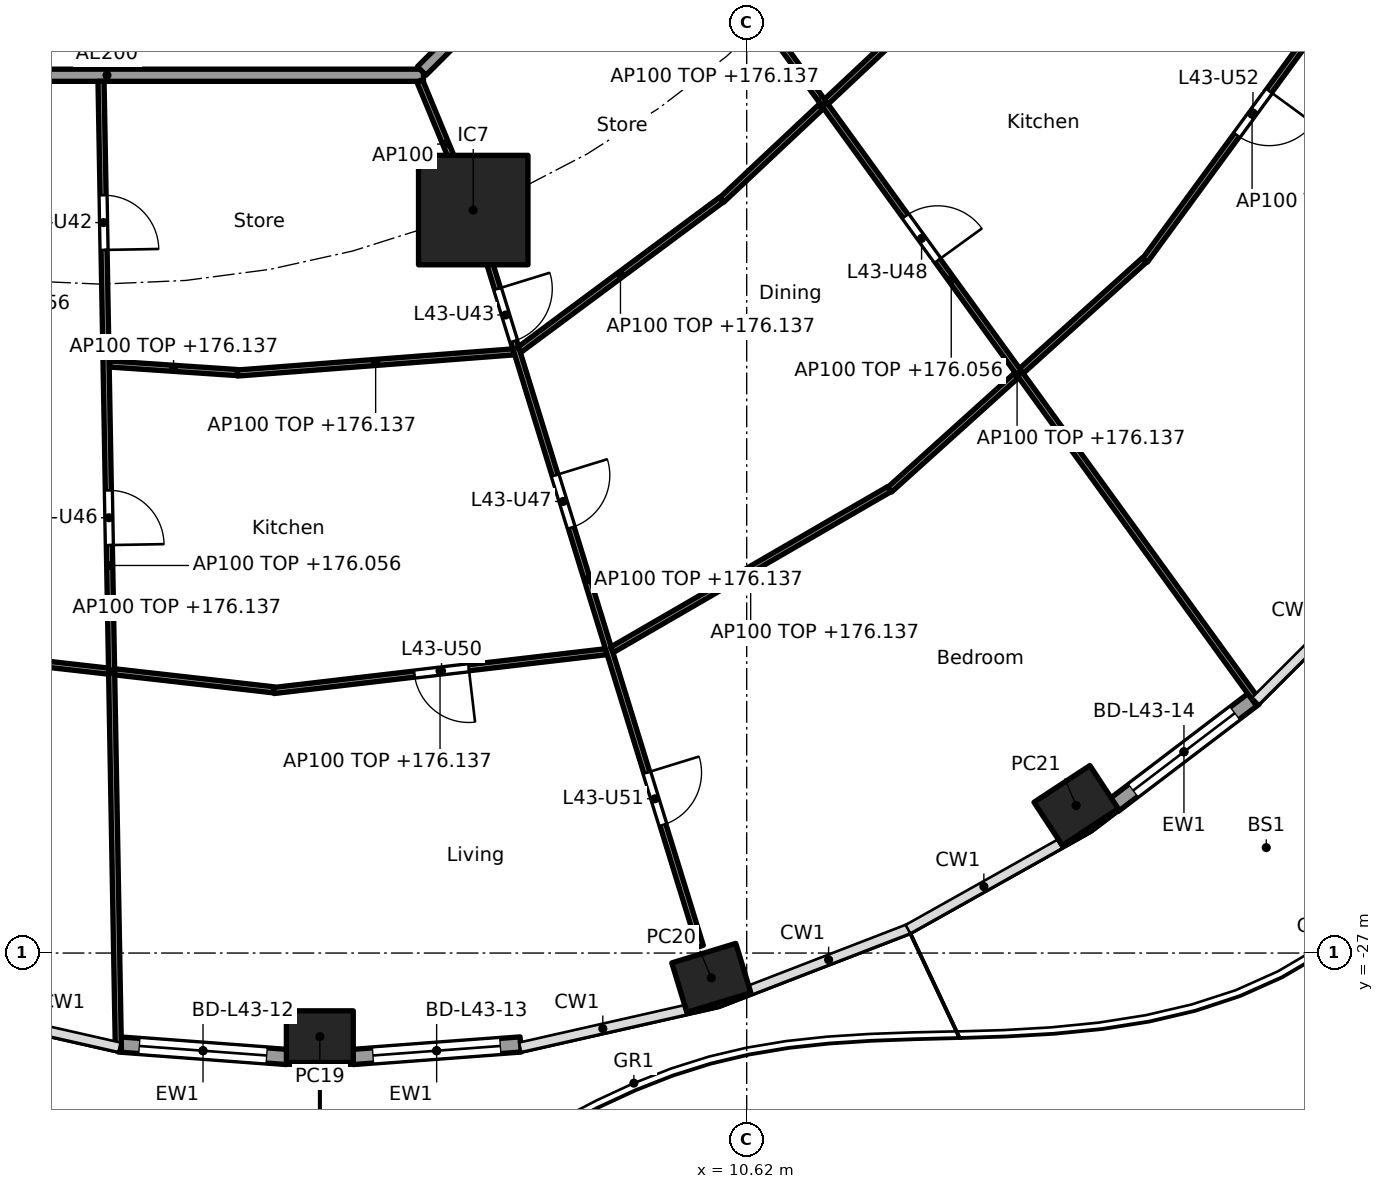
"""IFC4 building model, lengths in metres.
Left out: names, types, materials, properties, quantities, classifications, styles, units other than length and angle.
Written with IfcOpenShell. Run it as: python <this file> out.ifc"""

import sys

from ifc_helpers import new_model, si_unit, direction, frame, frame_2d, origin, origin_2d, place, context, subcontext, project, spatial, rectangle, hollow_rectangle, extrude, element, fill, save


model = new_model("IFC4")
c1 = context("Model", 3, precision=1e-05, world=origin(), true_north=direction((0.0, 1.0)))
c2 = subcontext(c1, "Body", "Model", "MODEL_VIEW")
j1 = project(units=[si_unit("LENGTHUNIT", "METRE"), si_unit("PLANEANGLEUNIT", "RADIAN")], contexts=[c1])
p1 = place(None, origin())
s1 = spatial("IfcSite", under=j1, at=p1, CompositionType="ELEMENT")
p2 = place(p1, origin())
s2 = spatial("IfcBuilding", under=s1, at=p2, CompositionType="ELEMENT")
p3 = place(p2, frame((0.0, 0.0, 173.3)))
s3 = spatial("IfcBuildingStorey", under=s2, at=p3, CompositionType="ELEMENT", Elevation=173.3)
for number, where, z_axis, x_axis in (
    (1, (3.6, -28.375, 0.0), (0.0, 0.0, 1.0), (1.0, 0.0, 0.0)),
    (2, (10.038, -27.408, 0.0), (0.0, 0.0, 1.0), (0.957, 0.292, 0.0)),
    (3, (16.038, -24.573, 0.0), (0.0, 0.0, 1.0), (0.836, 0.549, 0.0)),
):
    element("IfcColumn", number, at=place(p3, frame(where, z_axis=z_axis, x_axis=x_axis)), inside=s3, PredefinedType="COLUMN", context=c2, shape_type="SweptSolid", body=[
        extrude(hollow_rectangle(XDim=1.1, YDim=0.85, WallThickness=0.036, at=origin_2d()), origin(), (0.0, 0.0, 1.0), 3.7),
    ])
p4 = place(p3, frame((6.123, -14.782, 0.0), z_axis=(0.0, 0.0, 1.0), x_axis=(1.0, 0.0, 0.0)))
e4 = element("IfcColumn", 4, at=p4, inside=s3, PredefinedType="COLUMN", context=c2, shape_type="SweptSolid", body=[
    extrude(rectangle(XDim=1.8, YDim=1.8, at=origin_2d()), origin(), (0.0, 0.0, 1.0), 3.7),
])
p5 = place(p3, frame((3.061, -28.709, 0.0), z_axis=(0.0, 0.0, 1.0), x_axis=(-0.997232064422, 0.074351931305, 0.0)))
e5 = element("IfcWall", 5, at=p5, inside=s3, PredefinedType="SOLIDWALL", context=c2, shape_type="SweptSolid", body=[
    extrude(rectangle(XDim=2.771, YDim=0.25, at=frame_2d((1.386, 0.0))), origin(), (0.0, 0.0, 1.0), 3.44),
])
p6 = place(p5, frame((0.336, 0.0, 0.0)))
e6 = element("IfcOpeningElement", 6, at=p6, cuts=e5, PredefinedType="OPENING", context=c2, shape_type="SweptSolid", body=[
    extrude(rectangle(XDim=2.1, YDim=2.4, at=frame_2d((1.05, 1.2))), frame((0.0, 0.135, 0.0), z_axis=(0.0, -1.0, 0.0), x_axis=(1.0, 0.0, 0.0)), (0.0, 0.0, 1.0), 0.27),
])
p7 = place(p3, frame((6.903, -28.503, 0.0), z_axis=(0.0, 0.0, 1.0), x_axis=(-0.997232064422, -0.074351931305, 0.0)))
e7 = element("IfcWall", 7, at=p7, inside=s3, PredefinedType="SOLIDWALL", context=c2, shape_type="SweptSolid", body=[
    extrude(rectangle(XDim=2.771, YDim=0.25, at=frame_2d((1.386, 0.0))), origin(), (0.0, 0.0, 1.0), 3.44),
])
p8 = place(p7, frame((0.336, 0.0, 0.0)))
e8 = element("IfcOpeningElement", 8, at=p8, cuts=e7, PredefinedType="OPENING", context=c2, shape_type="SweptSolid", body=[
    extrude(rectangle(XDim=2.1, YDim=2.4, at=frame_2d((1.05, 1.2))), frame((0.0, 0.135, 0.0), z_axis=(0.0, -1.0, 0.0), x_axis=(1.0, 0.0, 0.0)), (0.0, 0.0, 1.0), 0.27),
])
p9 = place(p3, frame((18.972, -22.809, 0.0), z_axis=(0.0, 0.0, 1.0), x_axis=(-0.796055733703, -0.60522332146, 0.0)))
e9 = element("IfcWall", 9, at=p9, inside=s3, PredefinedType="SOLIDWALL", context=c2, shape_type="SweptSolid", body=[
    extrude(rectangle(XDim=2.917, YDim=0.25, at=frame_2d((1.458, 0.0))), origin(), (0.0, 0.0, 1.0), 3.44),
])
p10 = place(p9, frame((0.408, 0.0, 0.0)))
e10 = element("IfcOpeningElement", 10, at=p10, cuts=e9, PredefinedType="OPENING", context=c2, shape_type="SweptSolid", body=[
    extrude(rectangle(XDim=2.1, YDim=2.4, at=frame_2d((1.05, 1.2))), frame((0.0, 0.135, 0.0), z_axis=(0.0, -1.0, 0.0), x_axis=(1.0, 0.0, 0.0)), (0.0, 0.0, 1.0), 0.27),
])
p11 = place(p3, frame((14.822, -6.154, 0.0), z_axis=(0.0, 0.0, 1.0), x_axis=(0.792203056092, -0.610257583254, 0.0)))
e11 = element("IfcWall", 11, at=p11, inside=s3, PredefinedType="PARTITIONING", context=c2, shape_type="SweptSolid", body=[
    extrude(rectangle(XDim=12.533, YDim=0.2, at=frame_2d((6.266, 0.0))), origin(), (0.0, 0.0, 1.0), 2.837),
])
p12 = place(p3, frame((-5.104, -12.565, 0.0), z_axis=(0.0, 0.0, 1.0), x_axis=(1.0, 0.0, 0.0)))
e12 = element("IfcWall", 12, at=p12, inside=s3, PredefinedType="PARTITIONING", context=c2, shape_type="SweptSolid", body=[
    extrude(rectangle(XDim=10.409, YDim=0.2, at=frame_2d((5.205, 0.0))), origin(), (0.0, 0.0, 1.0), 3.44),
])
p13 = place(p12, frame((2.87, 0.0, 0.0)))
e13 = element("IfcOpeningElement", 13, at=p13, cuts=e12, PredefinedType="OPENING", context=c2, shape_type="SweptSolid", body=[
    extrude(rectangle(XDim=1.0, YDim=2.1, at=frame_2d((0.5, 1.05))), frame((0.0, 0.11, 0.0), z_axis=(0.0, -1.0, 0.0), x_axis=(1.0, 0.0, 0.0)), (0.0, 0.0, 1.0), 0.22),
])
p14 = place(p3, frame((5.275, -12.494, 0.0), z_axis=(0.0, 0.0, 1.0), x_axis=(0.707106781187, 0.707106781187, 0.0)))
e14 = element("IfcWall", 14, at=p14, inside=s3, PredefinedType="PARTITIONING", context=c2, shape_type="SweptSolid", body=[
    extrude(rectangle(XDim=10.409, YDim=0.2, at=frame_2d((5.205, 0.0))), origin(), (0.0, 0.0, 1.0), 3.44),
])
p15 = place(p3, frame((-2.449, -22.073, 0.0), z_axis=(0.0, 0.0, 1.0), x_axis=(0.993660315081, -0.112424099879, 0.0)))
e15 = element("IfcWall", 15, at=p15, inside=s3, PredefinedType="PARTITIONING", context=c2, shape_type="SweptSolid", body=[
    extrude(rectangle(XDim=5.325, YDim=0.1, at=frame_2d((2.662, 0.0))), origin(), (0.0, 0.0, 1.0), 2.837),
])
p16 = place(p3, frame((0.002, -12.665, 0.0), z_axis=(0.0, 0.0, 1.0), x_axis=(0.01792079652, -0.999839409631, 0.0)))
e16 = element("IfcWall", 16, at=p16, inside=s3, PredefinedType="PARTITIONING", context=c2, shape_type="SweptSolid", body=[
    extrude(rectangle(XDim=15.926, YDim=0.1, at=frame_2d((7.963, 0.0))), origin(), (0.0, 0.0, 1.0), 2.756),
])
p17 = place(p16, frame((1.873, 0.0, 0.0)))
e17 = element("IfcOpeningElement", 17, at=p17, cuts=e16, PredefinedType="OPENING", context=c2, shape_type="SweptSolid", body=[
    extrude(rectangle(XDim=0.9, YDim=2.1, at=frame_2d((0.45, 1.05))), frame((0.0, 0.06, 0.0), z_axis=(0.0, -1.0, 0.0), x_axis=(1.0, 0.0, 0.0)), (0.0, 0.0, 1.0), 0.12),
])
p18 = place(p16, frame((6.728, 0.0, 0.0)))
e18 = element("IfcOpeningElement", 18, at=p18, cuts=e16, PredefinedType="OPENING", context=c2, shape_type="SweptSolid", body=[
    extrude(rectangle(XDim=0.9, YDim=2.1, at=frame_2d((0.45, 1.05))), frame((0.0, 0.06, 0.0), z_axis=(0.0, -1.0, 0.0), x_axis=(1.0, 0.0, 0.0)), (0.0, 0.0, 1.0), 0.12),
])
p19 = place(p3, frame((0.145, -17.314, 0.0), z_axis=(0.0, 0.0, 1.0), x_axis=(0.997756833447, -0.06694252243, 0.0)))
e19 = element("IfcWall", 19, at=p19, inside=s3, PredefinedType="PARTITIONING", context=c2, shape_type="SweptSolid", body=[
    extrude(rectangle(XDim=2.104, YDim=0.1, at=frame_2d((1.052, 0.0))), origin(), (0.0, 0.0, 1.0), 2.837),
])
p20 = place(p3, frame((2.245, -17.462, 0.0), z_axis=(0.0, 0.0, 1.0), x_axis=(0.997077117727, 0.07640171009, 0.0)))
e20 = element("IfcWall", 20, at=p20, inside=s3, PredefinedType="PARTITIONING", context=c2, shape_type="SweptSolid", body=[
    extrude(rectangle(XDim=4.56, YDim=0.1, at=frame_2d((2.28, 0.0))), origin(), (0.0, 0.0, 1.0), 2.837),
])
p21 = place(p3, frame((2.842, -22.683, 0.0), z_axis=(0.0, 0.0, 1.0), x_axis=(0.993248590259, 0.116005335864, 0.0)))
e21 = element("IfcWall", 21, at=p21, inside=s3, PredefinedType="PARTITIONING", context=c2, shape_type="SweptSolid", body=[
    extrude(rectangle(XDim=5.508, YDim=0.1, at=frame_2d((2.754, 0.0))), origin(), (0.0, 0.0, 1.0), 2.837),
])
p22 = place(p21, frame((2.329, 0.0, 0.0)))
e22 = element("IfcOpeningElement", 22, at=p22, cuts=e21, PredefinedType="OPENING", context=c2, shape_type="SweptSolid", body=[
    extrude(rectangle(XDim=0.9, YDim=2.1, at=frame_2d((0.45, 1.05))), frame((0.0, 0.06, 0.0), z_axis=(0.0, -1.0, 0.0), x_axis=(1.0, 0.0, 0.0)), (0.0, 0.0, 1.0), 0.12),
])
p23 = place(p3, frame((5.243, -12.657, 0.0), z_axis=(0.0, 0.0, 1.0), x_axis=(0.382719158442, -0.923864733477, 0.0)))
e23 = element("IfcWall", 23, at=p23, inside=s3, PredefinedType="PARTITIONING", context=c2, shape_type="SweptSolid", body=[
    extrude(rectangle(XDim=2.25, YDim=0.1, at=frame_2d((1.125, 0.0))), origin(), (0.0, 0.0, 1.0), 3.44),
])
p24 = place(p3, frame((6.138, -14.83, 0.0), z_axis=(0.0, 0.0, 1.0), x_axis=(0.294818517221, -0.955553264818, 0.0)))
e24 = element("IfcWall", 24, at=p24, inside=s3, PredefinedType="PARTITIONING", context=c2, shape_type="SweptSolid", body=[
    extrude(rectangle(XDim=12.619, YDim=0.1, at=frame_2d((6.31, 0.0))), origin(), (0.0, 0.0, 1.0), 2.837),
])
p25 = place(p24, frame((1.306, 0.0, 0.0)))
e25 = element("IfcOpeningElement", 25, at=p25, cuts=e24, PredefinedType="OPENING", context=c2, shape_type="SweptSolid", body=[
    extrude(rectangle(XDim=0.9, YDim=2.1, at=frame_2d((0.45, 1.05))), frame((0.0, 0.06, 0.0), z_axis=(0.0, -1.0, 0.0), x_axis=(1.0, 0.0, 0.0)), (0.0, 0.0, 1.0), 0.12),
])
p26 = place(p24, frame((4.515, 0.0, 0.0)))
e26 = element("IfcOpeningElement", 26, at=p26, cuts=e24, PredefinedType="OPENING", context=c2, shape_type="SweptSolid", body=[
    extrude(rectangle(XDim=0.9, YDim=2.1, at=frame_2d((0.45, 1.05))), frame((0.0, 0.06, 0.0), z_axis=(0.0, -1.0, 0.0), x_axis=(1.0, 0.0, 0.0)), (0.0, 0.0, 1.0), 0.12),
])
p27 = place(p24, frame((9.632, 0.0, 0.0)))
e27 = element("IfcOpeningElement", 27, at=p27, cuts=e24, PredefinedType="OPENING", context=c2, shape_type="SweptSolid", body=[
    extrude(rectangle(XDim=0.9, YDim=2.1, at=frame_2d((0.45, 1.05))), frame((0.0, 0.06, 0.0), z_axis=(0.0, -1.0, 0.0), x_axis=(1.0, 0.0, 0.0)), (0.0, 0.0, 1.0), 0.12),
])
p28 = place(p3, frame((6.881, -17.08, 0.0), z_axis=(0.0, 0.0, 1.0), x_axis=(0.802784956441, 0.596268659005, 0.0)))
e28 = element("IfcWall", 28, at=p28, inside=s3, PredefinedType="PARTITIONING", context=c2, shape_type="SweptSolid", body=[
    extrude(rectangle(XDim=4.142, YDim=0.1, at=frame_2d((2.071, 0.0))), origin(), (0.0, 0.0, 1.0), 2.837),
])
p29 = place(p3, frame((8.405, -22.013, 0.0), z_axis=(0.0, 0.0, 1.0), x_axis=(0.865277177388, 0.501293732547, 0.0)))
e29 = element("IfcWall", 29, at=p29, inside=s3, PredefinedType="PARTITIONING", context=c2, shape_type="SweptSolid", body=[
    extrude(rectangle(XDim=5.27, YDim=0.1, at=frame_2d((2.635, 0.0))), origin(), (0.0, 0.0, 1.0), 2.837),
])
p30 = place(p3, frame((10.21, -14.614, 0.0), z_axis=(0.0, 0.0, 1.0), x_axis=(0.728883199496, 0.684638066055, 0.0)))
e30 = element("IfcWall", 30, at=p30, inside=s3, PredefinedType="PARTITIONING", context=c2, shape_type="SweptSolid", body=[
    extrude(rectangle(XDim=4.519, YDim=0.1, at=frame_2d((2.26, 0.0))), origin(), (0.0, 0.0, 1.0), 2.837),
])
p31 = place(p3, frame((12.971, -19.38, 0.0), z_axis=(0.0, 0.0, 1.0), x_axis=(0.742768881471, 0.669547898748, 0.0)))
e31 = element("IfcWall", 31, at=p31, inside=s3, PredefinedType="PARTITIONING", context=c2, shape_type="SweptSolid", body=[
    extrude(rectangle(XDim=5.642, YDim=0.1, at=frame_2d((2.821, 0.0))), origin(), (0.0, 0.0, 1.0), 2.837),
])
p32 = place(p3, frame((8.943, -8.966, 0.0), z_axis=(0.0, 0.0, 1.0), x_axis=(0.586803608919, -0.809729290912, 0.0)))
e32 = element("IfcWall", 32, at=p32, inside=s3, PredefinedType="PARTITIONING", context=c2, shape_type="SweptSolid", body=[
    extrude(rectangle(XDim=17.179, YDim=0.1, at=frame_2d((8.589, 0.0))), origin(), (0.0, 0.0, 1.0), 2.756),
])
p33 = place(p32, frame((2.062, 0.0, 0.0)))
e33 = element("IfcOpeningElement", 33, at=p33, cuts=e32, PredefinedType="OPENING", context=c2, shape_type="SweptSolid", body=[
    extrude(rectangle(XDim=0.9, YDim=2.1, at=frame_2d((0.45, 1.05))), frame((0.0, 0.06, 0.0), z_axis=(0.0, -1.0, 0.0), x_axis=(1.0, 0.0, 0.0)), (0.0, 0.0, 1.0), 0.12),
])
p34 = place(p32, frame((7.308, 0.0, 0.0)))
e34 = element("IfcOpeningElement", 34, at=p34, cuts=e32, PredefinedType="OPENING", context=c2, shape_type="SweptSolid", body=[
    extrude(rectangle(XDim=0.9, YDim=2.1, at=frame_2d((0.45, 1.05))), frame((0.0, 0.06, 0.0), z_axis=(0.0, -1.0, 0.0), x_axis=(1.0, 0.0, 0.0)), (0.0, 0.0, 1.0), 0.12),
])
p35 = place(p3, frame((17.169, -15.609, 0.0), z_axis=(0.0, 0.0, 1.0), x_axis=(0.591122127251, 0.806582066918, 0.0)))
e35 = element("IfcWall", 35, at=p35, inside=s3, PredefinedType="PARTITIONING", context=c2, shape_type="SweptSolid", body=[
    extrude(rectangle(XDim=5.96, YDim=0.1, at=frame_2d((2.98, 0.0))), origin(), (0.0, 0.0, 1.0), 2.837),
])
p36 = place(p35, frame((2.555, 0.0, 0.0)))
e36 = element("IfcOpeningElement", 36, at=p36, cuts=e35, PredefinedType="OPENING", context=c2, shape_type="SweptSolid", body=[
    extrude(rectangle(XDim=0.9, YDim=2.1, at=frame_2d((0.45, 1.05))), frame((0.0, 0.06, 0.0), z_axis=(0.0, -1.0, 0.0), x_axis=(1.0, 0.0, 0.0)), (0.0, 0.0, 1.0), 0.12),
])
p37 = place(p6, origin())
e37 = element("IfcDoor", 37, at=p37, inside=s3, OperationType="SLIDING_TO_LEFT", PredefinedType="DOOR", context=c2, shape_type="SweptSolid", body=[
    extrude(rectangle(XDim=2.1, YDim=2.4, at=frame_2d((1.05, 1.2))), frame((0.0, 0.025, 0.0), z_axis=(0.0, -1.0, 0.0), x_axis=(1.0, 0.0, 0.0)), (0.0, 0.0, 1.0), 0.05),
])
fill(e6, e37)
p38 = place(p8, origin())
e38 = element("IfcDoor", 38, at=p38, inside=s3, OperationType="SLIDING_TO_LEFT", PredefinedType="DOOR", context=c2, shape_type="SweptSolid", body=[
    extrude(rectangle(XDim=2.1, YDim=2.4, at=frame_2d((1.05, 1.2))), frame((0.0, 0.025, 0.0), z_axis=(0.0, -1.0, 0.0), x_axis=(1.0, 0.0, 0.0)), (0.0, 0.0, 1.0), 0.05),
])
fill(e8, e38)
p39 = place(p10, origin())
e39 = element("IfcDoor", 39, at=p39, inside=s3, OperationType="SLIDING_TO_LEFT", PredefinedType="DOOR", context=c2, shape_type="SweptSolid", body=[
    extrude(rectangle(XDim=2.1, YDim=2.4, at=frame_2d((1.05, 1.2))), frame((0.0, 0.025, 0.0), z_axis=(0.0, -1.0, 0.0), x_axis=(1.0, 0.0, 0.0)), (0.0, 0.0, 1.0), 0.05),
])
fill(e10, e39)
p40 = place(p17, origin())
e40 = element("IfcDoor", 40, at=p40, inside=s3, OperationType="SINGLE_SWING_RIGHT", PredefinedType="DOOR", context=c2, shape_type="SweptSolid", body=[
    extrude(rectangle(XDim=0.9, YDim=2.1, at=frame_2d((0.45, 1.05))), frame((0.0, 0.025, 0.0), z_axis=(0.0, -1.0, 0.0), x_axis=(1.0, 0.0, 0.0)), (0.0, 0.0, 1.0), 0.05),
])
fill(e17, e40)
p41 = place(p25, origin())
e41 = element("IfcDoor", 41, at=p41, inside=s3, OperationType="SINGLE_SWING_LEFT", PredefinedType="DOOR", context=c2, shape_type="SweptSolid", body=[
    extrude(rectangle(XDim=0.9, YDim=2.1, at=frame_2d((0.45, 1.05))), frame((0.0, 0.025, 0.0), z_axis=(0.0, -1.0, 0.0), x_axis=(1.0, 0.0, 0.0)), (0.0, 0.0, 1.0), 0.05),
])
fill(e25, e41)
p42 = place(p18, origin())
e42 = element("IfcDoor", 42, at=p42, inside=s3, OperationType="SINGLE_SWING_RIGHT", PredefinedType="DOOR", context=c2, shape_type="SweptSolid", body=[
    extrude(rectangle(XDim=0.9, YDim=2.1, at=frame_2d((0.45, 1.05))), frame((0.0, 0.025, 0.0), z_axis=(0.0, -1.0, 0.0), x_axis=(1.0, 0.0, 0.0)), (0.0, 0.0, 1.0), 0.05),
])
fill(e18, e42)
p43 = place(p26, origin())
e43 = element("IfcDoor", 43, at=p43, inside=s3, OperationType="SINGLE_SWING_LEFT", PredefinedType="DOOR", context=c2, shape_type="SweptSolid", body=[
    extrude(rectangle(XDim=0.9, YDim=2.1, at=frame_2d((0.45, 1.05))), frame((0.0, 0.025, 0.0), z_axis=(0.0, -1.0, 0.0), x_axis=(1.0, 0.0, 0.0)), (0.0, 0.0, 1.0), 0.05),
])
fill(e26, e43)
p44 = place(p34, origin())
e44 = element("IfcDoor", 44, at=p44, inside=s3, OperationType="SINGLE_SWING_RIGHT", PredefinedType="DOOR", context=c2, shape_type="SweptSolid", body=[
    extrude(rectangle(XDim=0.9, YDim=2.1, at=frame_2d((0.45, 1.05))), frame((0.0, 0.025, 0.0), z_axis=(0.0, -1.0, 0.0), x_axis=(1.0, 0.0, 0.0)), (0.0, 0.0, 1.0), 0.05),
])
fill(e34, e44)
p45 = place(p22, frame((0.9, 0.0, 0.0), x_axis=(-1.0, 0.0, 0.0)))
e45 = element("IfcDoor", 45, at=p45, inside=s3, OperationType="SINGLE_SWING_LEFT", PredefinedType="DOOR", context=c2, shape_type="SweptSolid", body=[
    extrude(rectangle(XDim=0.9, YDim=2.1, at=frame_2d((0.45, 1.05))), frame((0.0, 0.025, 0.0), z_axis=(0.0, -1.0, 0.0), x_axis=(1.0, 0.0, 0.0)), (0.0, 0.0, 1.0), 0.05),
])
fill(e22, e45)
p46 = place(p27, origin())
e46 = element("IfcDoor", 46, at=p46, inside=s3, OperationType="SINGLE_SWING_LEFT", PredefinedType="DOOR", context=c2, shape_type="SweptSolid", body=[
    extrude(rectangle(XDim=0.9, YDim=2.1, at=frame_2d((0.45, 1.05))), frame((0.0, 0.025, 0.0), z_axis=(0.0, -1.0, 0.0), x_axis=(1.0, 0.0, 0.0)), (0.0, 0.0, 1.0), 0.05),
])
fill(e27, e46)
p47 = place(p36, frame((0.9, 0.0, 0.0), x_axis=(-1.0, 0.0, 0.0)))
e47 = element("IfcDoor", 47, at=p47, inside=s3, OperationType="SINGLE_SWING_LEFT", PredefinedType="DOOR", context=c2, shape_type="SweptSolid", body=[
    extrude(rectangle(XDim=0.9, YDim=2.1, at=frame_2d((0.45, 1.05))), frame((0.0, 0.025, 0.0), z_axis=(0.0, -1.0, 0.0), x_axis=(1.0, 0.0, 0.0)), (0.0, 0.0, 1.0), 0.05),
])
fill(e36, e47)
save(model, sys.argv[1])
